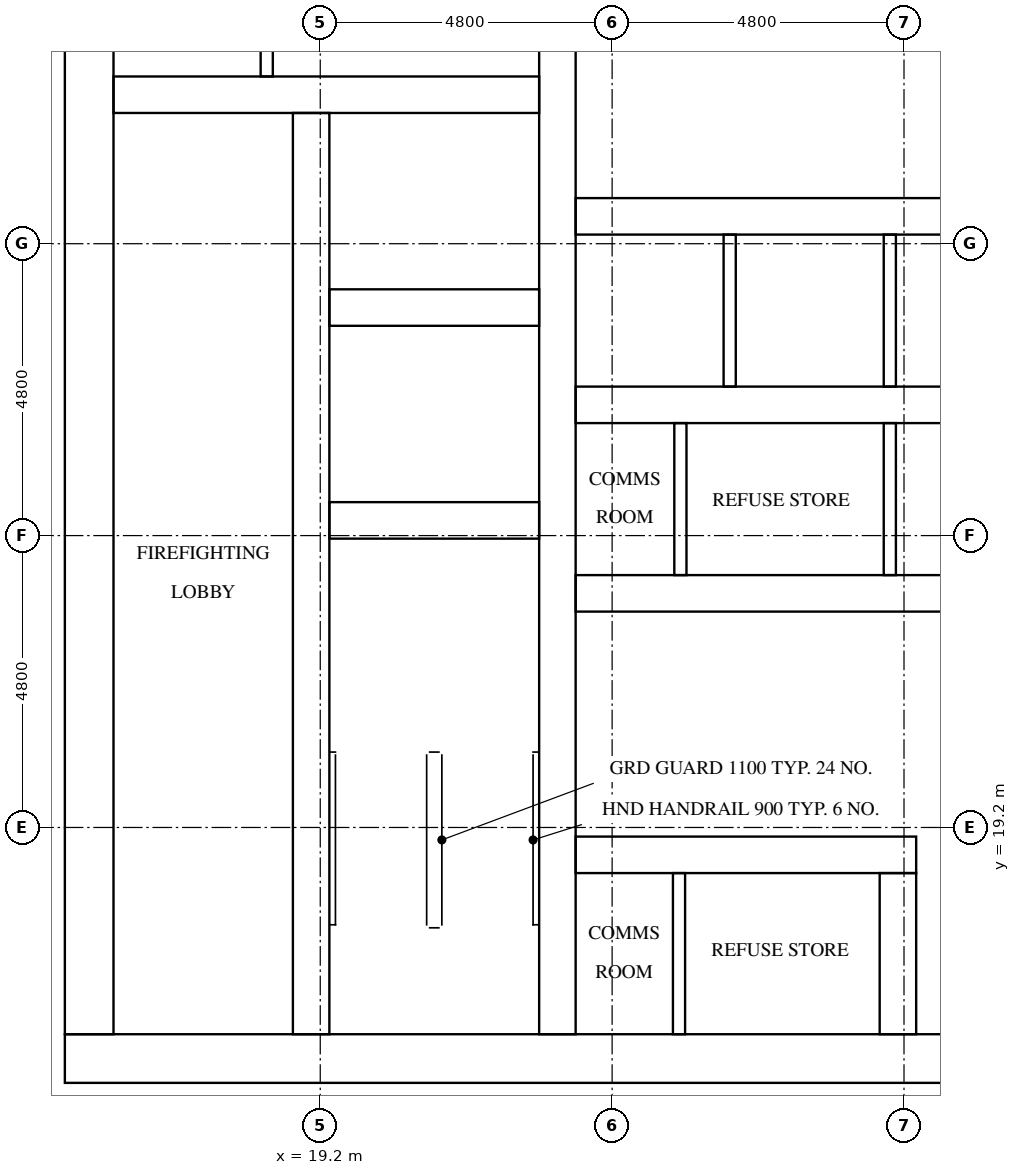
"""IFC4 building model, lengths in metres.
Left out: names, types, materials, properties, quantities, classifications, styles, units other than length and angle.
Written with IfcOpenShell. Run it as: python <this file> out.ifc"""

import sys

from ifc_helpers import new_model, si_unit, direction, frame, frame_2d, origin, place, context, subcontext, project, spatial, rectangle, extrude, element, fill, save


model = new_model("IFC4")
c1 = context("Model", 3, precision=1e-05, world=origin(), true_north=direction((0.0, 1.0)))
c2 = subcontext(c1, "Body", "Model", "MODEL_VIEW")
j1 = project(units=[si_unit("LENGTHUNIT", "METRE"), si_unit("PLANEANGLEUNIT", "RADIAN")], contexts=[c1])
p1 = place(None, origin())
s1 = spatial("IfcSite", under=j1, at=p1, CompositionType="ELEMENT")
p2 = place(p1, origin())
s2 = spatial("IfcBuilding", under=s1, at=p2, CompositionType="ELEMENT")
p3 = place(p2, frame((0.0, 0.0, 166.5)))
s3 = spatial("IfcBuildingStorey", under=s2, at=p3, CompositionType="ELEMENT", Elevation=166.5)
p4 = place(p3, frame((15.0, 15.4, 0.0), z_axis=(0.0, 0.0, 1.0), x_axis=(1.0, 0.0, 0.0)))
e1 = element("IfcWall", 1, at=p4, inside=s3, PredefinedType="SHEAR", context=c2, shape_type="SweptSolid", body=[
    extrude(rectangle(XDim=32.4, YDim=0.8, at=frame_2d((16.2, 0.0))), origin(), (0.0, 0.0, 1.0), 3.2),
])
p5 = place(p4, frame((15.3, 0.0, 0.0)))
e2 = element("IfcOpeningElement", 2, at=p5, cuts=e1, PredefinedType="OPENING", context=c2, shape_type="SweptSolid", body=[
    extrude(rectangle(XDim=1.8, YDim=2.1, at=frame_2d((0.9, 1.05))), frame((0.0, 0.41, 0.0), z_axis=(0.0, -1.0, 0.0), x_axis=(1.0, 0.0, 0.0)), (0.0, 0.0, 1.0), 0.82),
])
p6 = place(p3, frame((15.4, 15.8, 0.0), z_axis=(0.0, 0.0, 1.0), x_axis=(0.0, 1.0, 0.0)))
e3 = element("IfcWall", 3, at=p6, inside=s3, PredefinedType="SHEAR", context=c2, shape_type="SweptSolid", body=[
    extrude(rectangle(XDim=21.2, YDim=0.8, at=frame_2d((10.6, 0.0))), origin(), (0.0, 0.0, 1.0), 3.2),
])
p7 = place(p6, frame((4.96, 0.0, 0.0)))
e4 = element("IfcOpeningElement", 4, at=p7, cuts=e3, PredefinedType="OPENING", context=c2, shape_type="SweptSolid", body=[
    extrude(rectangle(XDim=1.2, YDim=2.1, at=frame_2d((0.6, 1.05))), frame((0.0, 0.41, 0.0), z_axis=(0.0, -1.0, 0.0), x_axis=(1.0, 0.0, 0.0)), (0.0, 0.0, 1.0), 0.82),
])
p8 = place(p3, frame((19.05, 15.8, 0.0), z_axis=(0.0, 0.0, 1.0), x_axis=(0.0, 1.0, 0.0)))
e5 = element("IfcWall", 5, at=p8, inside=s3, PredefinedType="SHEAR", context=c2, shape_type="SweptSolid", body=[
    extrude(rectangle(XDim=15.15, YDim=0.6, at=frame_2d((7.575, 0.0))), origin(), (0.0, 0.0, 1.0), 3.2),
])
p9 = place(p8, frame((9.65, 0.0, 0.0)))
e6 = element("IfcOpeningElement", 6, at=p9, cuts=e5, PredefinedType="OPENING", context=c2, shape_type="SweptSolid", body=[
    extrude(rectangle(XDim=1.1, YDim=2.1, at=frame_2d((0.55, 1.05))), frame((0.0, 0.31, 0.0), z_axis=(0.0, -1.0, 0.0), x_axis=(1.0, 0.0, 0.0)), (0.0, 0.0, 1.0), 0.62),
])
p10 = place(p8, frame((13.15, 0.0, 0.0)))
e7 = element("IfcOpeningElement", 7, at=p10, cuts=e5, PredefinedType="OPENING", context=c2, shape_type="SweptSolid", body=[
    extrude(rectangle(XDim=1.1, YDim=2.1, at=frame_2d((0.55, 1.05))), frame((0.0, 0.31, 0.0), z_axis=(0.0, -1.0, 0.0), x_axis=(1.0, 0.0, 0.0)), (0.0, 0.0, 1.0), 0.62),
])
p11 = place(p8, frame((0.4, 0.0, 0.0)))
e8 = element("IfcOpeningElement", 8, at=p11, cuts=e5, PredefinedType="OPENING", context=c2, shape_type="SweptSolid", body=[
    extrude(rectangle(XDim=1.2, YDim=2.1, at=frame_2d((0.6, 1.05))), frame((0.0, 0.31, 0.0), z_axis=(0.0, -1.0, 0.0), x_axis=(1.0, 0.0, 0.0)), (0.0, 0.0, 1.0), 0.62),
])
p12 = place(p3, frame((23.1, 15.8, 0.0), z_axis=(0.0, 0.0, 1.0), x_axis=(0.0, 1.0, 0.0)))
e9 = element("IfcWall", 9, at=p12, inside=s3, PredefinedType="SHEAR", context=c2, shape_type="SweptSolid", body=[
    extrude(rectangle(XDim=21.2, YDim=0.6, at=frame_2d((10.6, 0.0))), origin(), (0.0, 0.0, 1.0), 3.2),
])
for number, where, z_axis, x_axis in (
    (10, (19.35, 24.25, 0.0), (0.0, 0.0, 1.0), (1.0, 0.0, 0.0)),
    (11, (19.35, 27.75, 0.0), (0.0, 0.0, 1.0), (1.0, 0.0, 0.0)),
):
    element("IfcWall", number, at=place(p3, frame(where, z_axis=z_axis, x_axis=x_axis)), inside=s3, PredefinedType="SHEAR", context=c2, shape_type="SweptSolid", body=[
        extrude(rectangle(XDim=3.45, YDim=0.6, at=frame_2d((1.725, 0.0))), origin(), (0.0, 0.0, 1.0), 3.2),
    ])
p13 = place(p3, frame((15.8, 31.25, 0.0), z_axis=(0.0, 0.0, 1.0), x_axis=(1.0, 0.0, 0.0)))
e12 = element("IfcWall", 12, at=p13, inside=s3, PredefinedType="SHEAR", context=c2, shape_type="SweptSolid", body=[
    extrude(rectangle(XDim=7.0, YDim=0.6, at=frame_2d((3.5, 0.0))), origin(), (0.0, 0.0, 1.0), 3.2),
])
p14 = place(p3, frame((23.4, 18.75, 0.0), z_axis=(0.0, 0.0, 1.0), x_axis=(1.0, 0.0, 0.0)))
e13 = element("IfcWall", 13, at=p14, inside=s3, PredefinedType="SHEAR", context=c2, shape_type="SweptSolid", body=[
    extrude(rectangle(XDim=5.6, YDim=0.6, at=frame_2d((2.8, 0.0))), origin(), (0.0, 0.0, 1.0), 3.2),
])
p15 = place(p14, frame((0.3, 0.0, 0.0)))
e14 = element("IfcOpeningElement", 14, at=p15, cuts=e13, PredefinedType="OPENING", context=c2, shape_type="SweptSolid", body=[
    extrude(rectangle(XDim=1.0, YDim=2.1, at=frame_2d((0.5, 1.05))), frame((0.0, 0.31, 0.0), z_axis=(0.0, -1.0, 0.0), x_axis=(1.0, 0.0, 0.0)), (0.0, 0.0, 1.0), 0.62),
])
p16 = place(p14, frame((2.9, 0.0, 0.0)))
e15 = element("IfcOpeningElement", 15, at=p16, cuts=e13, PredefinedType="OPENING", context=c2, shape_type="SweptSolid", body=[
    extrude(rectangle(XDim=1.0, YDim=2.1, at=frame_2d((0.5, 1.05))), frame((0.0, 0.31, 0.0), z_axis=(0.0, -1.0, 0.0), x_axis=(1.0, 0.0, 0.0)), (0.0, 0.0, 1.0), 0.62),
])
p17 = place(p3, frame((23.4, 23.05, 0.0), z_axis=(0.0, 0.0, 1.0), x_axis=(1.0, 0.0, 0.0)))
e16 = element("IfcWall", 16, at=p17, inside=s3, PredefinedType="SHEAR", context=c2, shape_type="SweptSolid", body=[
    extrude(rectangle(XDim=15.6, YDim=0.6, at=frame_2d((7.8, 0.0))), origin(), (0.0, 0.0, 1.0), 3.2),
])
p18 = place(p17, frame((0.311, 0.0, 0.0)))
e17 = element("IfcOpeningElement", 17, at=p18, cuts=e16, PredefinedType="OPENING", context=c2, shape_type="SweptSolid", body=[
    extrude(rectangle(XDim=1.0, YDim=2.1, at=frame_2d((0.5, 1.05))), frame((0.0, 0.31, 0.0), z_axis=(0.0, -1.0, 0.0), x_axis=(1.0, 0.0, 0.0)), (0.0, 0.0, 1.0), 0.62),
])
p19 = place(p17, frame((2.945, 0.0, 0.0)))
e18 = element("IfcOpeningElement", 18, at=p19, cuts=e16, PredefinedType="OPENING", context=c2, shape_type="SweptSolid", body=[
    extrude(rectangle(XDim=1.0, YDim=2.1, at=frame_2d((0.5, 1.05))), frame((0.0, 0.31, 0.0), z_axis=(0.0, -1.0, 0.0), x_axis=(1.0, 0.0, 0.0)), (0.0, 0.0, 1.0), 0.62),
])
p20 = place(p17, frame((10.845, 0.0, 0.0)))
e19 = element("IfcOpeningElement", 19, at=p20, cuts=e16, PredefinedType="OPENING", context=c2, shape_type="SweptSolid", body=[
    extrude(rectangle(XDim=1.0, YDim=2.1, at=frame_2d((0.5, 1.05))), frame((0.0, 0.31, 0.0), z_axis=(0.0, -1.0, 0.0), x_axis=(1.0, 0.0, 0.0)), (0.0, 0.0, 1.0), 0.62),
])
p21 = place(p17, frame((13.478, 0.0, 0.0)))
e20 = element("IfcOpeningElement", 20, at=p21, cuts=e16, PredefinedType="OPENING", context=c2, shape_type="SweptSolid", body=[
    extrude(rectangle(XDim=1.0, YDim=2.1, at=frame_2d((0.5, 1.05))), frame((0.0, 0.31, 0.0), z_axis=(0.0, -1.0, 0.0), x_axis=(1.0, 0.0, 0.0)), (0.0, 0.0, 1.0), 0.62),
])
p22 = place(p3, frame((23.4, 26.15, 0.0), z_axis=(0.0, 0.0, 1.0), x_axis=(1.0, 0.0, 0.0)))
e21 = element("IfcWall", 21, at=p22, inside=s3, PredefinedType="SHEAR", context=c2, shape_type="SweptSolid", body=[
    extrude(rectangle(XDim=15.6, YDim=0.6, at=frame_2d((7.8, 0.0))), origin(), (0.0, 0.0, 1.0), 3.2),
])
p23 = place(p3, frame((23.4, 29.25, 0.0), z_axis=(0.0, 0.0, 1.0), x_axis=(1.0, 0.0, 0.0)))
e22 = element("IfcWall", 22, at=p23, inside=s3, PredefinedType="SHEAR", context=c2, shape_type="SweptSolid", body=[
    extrude(rectangle(XDim=15.6, YDim=0.6, at=frame_2d((7.8, 0.0))), origin(), (0.0, 0.0, 1.0), 3.2),
])
p24 = place(p23, frame((0.667, 0.0, 0.0)))
e23 = element("IfcOpeningElement", 23, at=p24, cuts=e22, PredefinedType="OPENING", context=c2, shape_type="SweptSolid", body=[
    extrude(rectangle(XDim=1.1, YDim=2.1, at=frame_2d((0.55, 1.05))), frame((0.0, 0.31, 0.0), z_axis=(0.0, -1.0, 0.0), x_axis=(1.0, 0.0, 0.0)), (0.0, 0.0, 1.0), 0.62),
])
p25 = place(p23, frame((3.3, 0.0, 0.0)))
e24 = element("IfcOpeningElement", 24, at=p25, cuts=e22, PredefinedType="OPENING", context=c2, shape_type="SweptSolid", body=[
    extrude(rectangle(XDim=1.1, YDim=2.1, at=frame_2d((0.55, 1.05))), frame((0.0, 0.31, 0.0), z_axis=(0.0, -1.0, 0.0), x_axis=(1.0, 0.0, 0.0)), (0.0, 0.0, 1.0), 0.62),
])
p26 = place(p23, frame((5.933, 0.0, 0.0)))
e25 = element("IfcOpeningElement", 25, at=p26, cuts=e22, PredefinedType="OPENING", context=c2, shape_type="SweptSolid", body=[
    extrude(rectangle(XDim=1.1, YDim=2.1, at=frame_2d((0.55, 1.05))), frame((0.0, 0.31, 0.0), z_axis=(0.0, -1.0, 0.0), x_axis=(1.0, 0.0, 0.0)), (0.0, 0.0, 1.0), 0.62),
])
p27 = place(p23, frame((8.567, 0.0, 0.0)))
e26 = element("IfcOpeningElement", 26, at=p27, cuts=e22, PredefinedType="OPENING", context=c2, shape_type="SweptSolid", body=[
    extrude(rectangle(XDim=1.1, YDim=2.1, at=frame_2d((0.55, 1.05))), frame((0.0, 0.31, 0.0), z_axis=(0.0, -1.0, 0.0), x_axis=(1.0, 0.0, 0.0)), (0.0, 0.0, 1.0), 0.62),
])
p28 = place(p23, frame((11.2, 0.0, 0.0)))
e27 = element("IfcOpeningElement", 27, at=p28, cuts=e22, PredefinedType="OPENING", context=c2, shape_type="SweptSolid", body=[
    extrude(rectangle(XDim=1.1, YDim=2.1, at=frame_2d((0.55, 1.05))), frame((0.0, 0.31, 0.0), z_axis=(0.0, -1.0, 0.0), x_axis=(1.0, 0.0, 0.0)), (0.0, 0.0, 1.0), 0.62),
])
p29 = place(p23, frame((13.833, 0.0, 0.0)))
e28 = element("IfcOpeningElement", 28, at=p29, cuts=e22, PredefinedType="OPENING", context=c2, shape_type="SweptSolid", body=[
    extrude(rectangle(XDim=1.1, YDim=2.1, at=frame_2d((0.55, 1.05))), frame((0.0, 0.31, 0.0), z_axis=(0.0, -1.0, 0.0), x_axis=(1.0, 0.0, 0.0)), (0.0, 0.0, 1.0), 0.62),
])
p30 = place(p3, frame((28.7, 15.8, 0.0), z_axis=(0.0, 0.0, 1.0), x_axis=(0.0, 1.0, 0.0)))
e29 = element("IfcWall", 29, at=p30, inside=s3, PredefinedType="SHEAR", context=c2, shape_type="SweptSolid", body=[
    extrude(rectangle(XDim=2.65, YDim=0.6, at=frame_2d((1.325, 0.0))), origin(), (0.0, 0.0, 1.0), 3.2),
])
for number, where, z_axis, x_axis in (
    (30, (25.933, 26.45, 0.0), (0.0, 0.0, 1.0), (0.0, 1.0, 0.0)),
    (31, (28.567, 23.35, 0.0), (0.0, 0.0, 1.0), (0.0, 1.0, 0.0)),
    (32, (28.567, 26.45, 0.0), (0.0, 0.0, 1.0), (0.0, 1.0, 0.0)),
):
    element("IfcWall", number, at=place(p3, frame(where, z_axis=z_axis, x_axis=x_axis)), inside=s3, PredefinedType="SOLIDWALL", context=c2, shape_type="SweptSolid", body=[
        extrude(rectangle(XDim=2.5, YDim=0.2, at=frame_2d((1.25, 0.0))), origin(), (0.0, 0.0, 1.0), 3.2),
    ])
p31 = place(p3, frame((18.32, 31.55, 0.0), z_axis=(0.0, 0.0, 1.0), x_axis=(0.0, 1.0, 0.0)))
e33 = element("IfcWall", 33, at=p31, inside=s3, PredefinedType="PARTITIONING", context=c2, shape_type="SweptSolid", body=[
    extrude(rectangle(XDim=5.45, YDim=0.2, at=frame_2d((2.725, 0.0))), origin(), (0.0, 0.0, 1.0), 3.2),
])
p32 = place(p3, frame((25.123, 23.35, 0.0), z_axis=(0.0, 0.0, 1.0), x_axis=(0.0, 1.0, 0.0)))
e34 = element("IfcWall", 34, at=p32, inside=s3, PredefinedType="PARTITIONING", context=c2, shape_type="SweptSolid", body=[
    extrude(rectangle(XDim=2.5, YDim=0.2, at=frame_2d((1.25, 0.0))), origin(), (0.0, 0.0, 1.0), 3.2),
])
p33 = place(p3, frame((25.1, 15.8, 0.0), z_axis=(0.0, 0.0, 1.0), x_axis=(0.0, 1.0, 0.0)))
e35 = element("IfcWall", 35, at=p33, inside=s3, PredefinedType="PARTITIONING", context=c2, shape_type="SweptSolid", body=[
    extrude(rectangle(XDim=2.65, YDim=0.2, at=frame_2d((1.325, 0.0))), origin(), (0.0, 0.0, 1.0), 3.2),
])
p34 = place(p24, origin())
e36 = element("IfcDoor", 36, at=p34, inside=s3, OperationType="DOUBLE_DOOR_SLIDING", PredefinedType="DOOR", context=c2, shape_type="SweptSolid", body=[
    extrude(rectangle(XDim=1.1, YDim=2.1, at=frame_2d((0.55, 1.05))), frame((0.0, 0.025, 0.0), z_axis=(0.0, -1.0, 0.0), x_axis=(1.0, 0.0, 0.0)), (0.0, 0.0, 1.0), 0.05),
])
fill(e23, e36)
p35 = place(p25, origin())
e37 = element("IfcDoor", 37, at=p35, inside=s3, OperationType="DOUBLE_DOOR_SLIDING", PredefinedType="DOOR", context=c2, shape_type="SweptSolid", body=[
    extrude(rectangle(XDim=1.1, YDim=2.1, at=frame_2d((0.55, 1.05))), frame((0.0, 0.025, 0.0), z_axis=(0.0, -1.0, 0.0), x_axis=(1.0, 0.0, 0.0)), (0.0, 0.0, 1.0), 0.05),
])
fill(e24, e37)
p36 = place(p26, origin())
e38 = element("IfcDoor", 38, at=p36, inside=s3, OperationType="DOUBLE_DOOR_SLIDING", PredefinedType="DOOR", context=c2, shape_type="SweptSolid", body=[
    extrude(rectangle(XDim=1.1, YDim=2.1, at=frame_2d((0.55, 1.05))), frame((0.0, 0.025, 0.0), z_axis=(0.0, -1.0, 0.0), x_axis=(1.0, 0.0, 0.0)), (0.0, 0.0, 1.0), 0.05),
])
fill(e25, e38)
p37 = place(p9, origin())
e39 = element("IfcDoor", 39, at=p37, inside=s3, OperationType="DOUBLE_DOOR_SLIDING", PredefinedType="DOOR", context=c2, shape_type="SweptSolid", body=[
    extrude(rectangle(XDim=1.1, YDim=2.1, at=frame_2d((0.55, 1.05))), frame((0.0, 0.025, 0.0), z_axis=(0.0, -1.0, 0.0), x_axis=(1.0, 0.0, 0.0)), (0.0, 0.0, 1.0), 0.05),
])
fill(e6, e39)
p38 = place(p10, origin())
e40 = element("IfcDoor", 40, at=p38, inside=s3, OperationType="DOUBLE_DOOR_SLIDING", PredefinedType="DOOR", context=c2, shape_type="SweptSolid", body=[
    extrude(rectangle(XDim=1.1, YDim=2.1, at=frame_2d((0.55, 1.05))), frame((0.0, 0.025, 0.0), z_axis=(0.0, -1.0, 0.0), x_axis=(1.0, 0.0, 0.0)), (0.0, 0.0, 1.0), 0.05),
])
fill(e7, e40)
p39 = place(p11, frame((1.2, 0.0, 0.0), z_axis=(0.0, 0.0, 1.0), x_axis=(-1.0, 0.0, 0.0)))
e41 = element("IfcDoor", 41, at=p39, inside=s3, OperationType="SINGLE_SWING_LEFT", PredefinedType="DOOR", context=c2, shape_type="SweptSolid", body=[
    extrude(rectangle(XDim=1.2, YDim=2.1, at=frame_2d((0.6, 1.05))), frame((0.0, 0.025, 0.0), z_axis=(0.0, -1.0, 0.0), x_axis=(1.0, 0.0, 0.0)), (0.0, 0.0, 1.0), 0.05),
])
fill(e8, e41)
p40 = place(p7, frame((1.2, 0.0, 0.0), z_axis=(0.0, 0.0, 1.0), x_axis=(-1.0, 0.0, 0.0)))
e42 = element("IfcDoor", 42, at=p40, inside=s3, OperationType="SINGLE_SWING_RIGHT", PredefinedType="DOOR", context=c2, shape_type="SweptSolid", body=[
    extrude(rectangle(XDim=1.2, YDim=2.1, at=frame_2d((0.6, 1.05))), frame((0.0, 0.025, 0.0), z_axis=(0.0, -1.0, 0.0), x_axis=(1.0, 0.0, 0.0)), (0.0, 0.0, 1.0), 0.05),
])
fill(e4, e42)
p41 = place(p18, frame((1.0, 0.0, 0.0), z_axis=(0.0, 0.0, 1.0), x_axis=(-1.0, 0.0, 0.0)))
e43 = element("IfcDoor", 43, at=p41, inside=s3, OperationType="SINGLE_SWING_RIGHT", PredefinedType="DOOR", context=c2, shape_type="SweptSolid", body=[
    extrude(rectangle(XDim=1.0, YDim=2.1, at=frame_2d((0.5, 1.05))), frame((0.0, 0.025, 0.0), z_axis=(0.0, -1.0, 0.0), x_axis=(1.0, 0.0, 0.0)), (0.0, 0.0, 1.0), 0.05),
])
fill(e17, e43)
p42 = place(p19, frame((1.0, 0.0, 0.0), z_axis=(0.0, 0.0, 1.0), x_axis=(-1.0, 0.0, 0.0)))
e44 = element("IfcDoor", 44, at=p42, inside=s3, OperationType="SINGLE_SWING_LEFT", PredefinedType="DOOR", context=c2, shape_type="SweptSolid", body=[
    extrude(rectangle(XDim=1.0, YDim=2.1, at=frame_2d((0.5, 1.05))), frame((0.0, 0.025, 0.0), z_axis=(0.0, -1.0, 0.0), x_axis=(1.0, 0.0, 0.0)), (0.0, 0.0, 1.0), 0.05),
])
fill(e18, e44)
p43 = place(p15, origin())
e45 = element("IfcDoor", 45, at=p43, inside=s3, OperationType="SINGLE_SWING_RIGHT", PredefinedType="DOOR", context=c2, shape_type="SweptSolid", body=[
    extrude(rectangle(XDim=1.0, YDim=2.1, at=frame_2d((0.5, 1.05))), frame((0.0, 0.025, 0.0), z_axis=(0.0, -1.0, 0.0), x_axis=(1.0, 0.0, 0.0)), (0.0, 0.0, 1.0), 0.05),
])
fill(e14, e45)
p44 = place(p16, origin())
e46 = element("IfcDoor", 46, at=p44, inside=s3, OperationType="SINGLE_SWING_LEFT", PredefinedType="DOOR", context=c2, shape_type="SweptSolid", body=[
    extrude(rectangle(XDim=1.0, YDim=2.1, at=frame_2d((0.5, 1.05))), frame((0.0, 0.025, 0.0), z_axis=(0.0, -1.0, 0.0), x_axis=(1.0, 0.0, 0.0)), (0.0, 0.0, 1.0), 0.05),
])
fill(e15, e46)
save(model, sys.argv[1])
